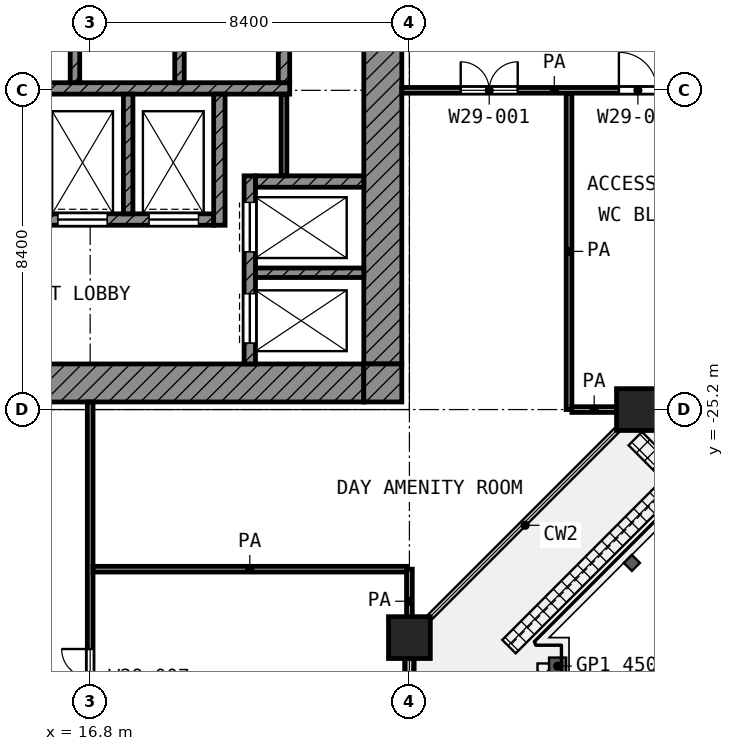
"""IFC4 building model, lengths in metres.
Left out: names, types, materials, properties, quantities, classifications, styles, units other than length and angle.
Written with IfcOpenShell. Run it as: python <this file> out.ifc"""

import sys

from ifc_helpers import new_model, si_unit, direction, frame, frame_2d, origin, origin_2d, place, context, subcontext, project, spatial, rectangle, extrude, element, fill, save


model = new_model("IFC4")
c1 = context("Model", 3, precision=1e-05, world=origin(), true_north=direction((0.0, 1.0)))
c2 = subcontext(c1, "Body", "Model", "MODEL_VIEW")
j1 = project(units=[si_unit("LENGTHUNIT", "METRE"), si_unit("PLANEANGLEUNIT", "RADIAN")], contexts=[c1])
p1 = place(None, origin())
s1 = spatial("IfcSite", under=j1, at=p1, CompositionType="ELEMENT")
p2 = place(p1, origin())
s2 = spatial("IfcBuilding", under=s1, at=p2, CompositionType="ELEMENT")
p3 = place(p2, frame((0.0, 0.0, 128.2)))
s3 = spatial("IfcBuildingStorey", under=s2, at=p3, CompositionType="ELEMENT", Elevation=128.2)
for number, where, z_axis, x_axis in (
    (1, (31.2, -25.2, 0.0), (0.0, 0.0, 1.0), (1.0, 0.0, 0.0)),
    (2, (25.2, -31.2, 0.0), (0.0, 0.0, 1.0), (1.0, 0.0, 0.0)),
):
    element("IfcColumn", number, at=place(p3, frame(where, z_axis=z_axis, x_axis=x_axis)), inside=s3, PredefinedType="COLUMN", context=c2, shape_type="SweptSolid", body=[
        extrude(rectangle(XDim=1.1, YDim=1.1, at=origin_2d()), origin(), (0.0, 0.0, 1.0), 4.2),
    ])
p4 = place(p3, frame((25.2, -34.992, 0.0), z_axis=(0.0, 0.0, 1.0), x_axis=(0.0, 1.0, 0.0)))
e3 = element("IfcWall", 3, at=p4, inside=s3, PredefinedType="SOLIDWALL", context=c2, shape_type="SweptSolid", body=[
    extrude(rectangle(XDim=3.242, YDim=0.25, at=frame_2d((1.621, 0.0))), origin(), (0.0, 0.0, 1.0), 3.48),
])
p5 = place(p4, frame((0.721, 0.0, 0.0)))
e4 = element("IfcOpeningElement", 4, at=p5, cuts=e3, PredefinedType="OPENING", context=c2, shape_type="SweptSolid", body=[
    extrude(rectangle(XDim=1.8, YDim=2.1, at=frame_2d((0.9, 1.05))), frame((0.0, 0.135, 0.0), z_axis=(0.0, -1.0, 0.0), x_axis=(1.0, 0.0, 0.0)), (0.0, 0.0, 1.0), 0.27),
])
p6 = place(p3, frame((24.5, -24.0, 0.0), z_axis=(0.0, 0.0, 1.0), x_axis=(0.0, 1.0, 0.0)))
e5 = element("IfcWall", 5, at=p6, inside=s3, PredefinedType="SHEAR", context=c2, shape_type="SweptSolid", body=[
    extrude(rectangle(XDim=18.6, YDim=1.0, at=frame_2d((9.3, 0.0))), origin(), (0.0, 0.0, 1.0), 3.6),
])
p7 = place(p6, frame((10.5, 0.0, 0.0)))
e6 = element("IfcOpeningElement", 6, at=p7, cuts=e5, PredefinedType="OPENING", context=c2, shape_type="SweptSolid", body=[
    extrude(rectangle(XDim=1.8, YDim=2.1, at=frame_2d((0.9, 1.05))), frame((0.0, 0.51, 0.0), z_axis=(0.0, -1.0, 0.0), x_axis=(1.0, 0.0, 0.0)), (0.0, 0.0, 1.0), 1.02),
])
p8 = place(p3, frame((5.4, -24.5, 0.0), z_axis=(0.0, 0.0, 1.0), x_axis=(1.0, 0.0, 0.0)))
e7 = element("IfcWall", 7, at=p8, inside=s3, PredefinedType="SHEAR", context=c2, shape_type="SweptSolid", body=[
    extrude(rectangle(XDim=18.6, YDim=1.0, at=frame_2d((9.3, 0.0))), origin(), (0.0, 0.0, 1.0), 3.6),
])
p9 = place(p8, frame((6.3, 0.0, 0.0)))
e8 = element("IfcOpeningElement", 8, at=p9, cuts=e7, PredefinedType="OPENING", context=c2, shape_type="SweptSolid", body=[
    extrude(rectangle(XDim=1.8, YDim=2.1, at=frame_2d((0.9, 1.05))), frame((0.0, 0.51, 0.0), z_axis=(0.0, -1.0, 0.0), x_axis=(1.0, 0.0, 0.0)), (0.0, 0.0, 1.0), 1.02),
])
p10 = place(p3, frame((24.5, -25.0, 0.0), z_axis=(0.0, 0.0, 1.0), x_axis=(0.0, 1.0, 0.0)))
e9 = element("IfcWall", 9, at=p10, inside=s3, PredefinedType="SHEAR", context=c2, shape_type="SweptSolid", body=[
    extrude(rectangle(XDim=1.0, YDim=1.0, at=frame_2d((0.5, 0.0))), origin(), (0.0, 0.0, 1.0), 3.6),
])
p11 = place(p3, frame((5.4, -16.75, 0.0), z_axis=(0.0, 0.0, 1.0), x_axis=(1.0, 0.0, 0.0)))
e10 = element("IfcWall", 10, at=p11, inside=s3, PredefinedType="SHEAR", context=c2, shape_type="SweptSolid", body=[
    extrude(rectangle(XDim=16.65, YDim=0.3, at=frame_2d((8.325, 0.0))), origin(), (0.0, 0.0, 1.0), 3.6),
])
p12 = place(p3, frame((5.4, -20.2, 0.0), z_axis=(0.0, 0.0, 1.0), x_axis=(1.0, 0.0, 0.0)))
e11 = element("IfcWall", 11, at=p12, inside=s3, PredefinedType="SHEAR", context=c2, shape_type="SweptSolid", body=[
    extrude(rectangle(XDim=14.65, YDim=0.3, at=frame_2d((7.325, 0.0))), origin(), (0.0, 0.0, 1.0), 3.6),
])
p13 = place(p12, frame((10.55, 0.0, 0.0)))
e12 = element("IfcOpeningElement", 12, at=p13, cuts=e11, PredefinedType="OPENING", context=c2, shape_type="SweptSolid", body=[
    extrude(rectangle(XDim=1.3, YDim=2.1, at=frame_2d((0.65, 1.05))), frame((0.0, 0.16, 0.0), z_axis=(0.0, -1.0, 0.0), x_axis=(1.0, 0.0, 0.0)), (0.0, 0.0, 1.0), 0.32),
])
p14 = place(p12, frame((12.95, 0.0, 0.0)))
e13 = element("IfcOpeningElement", 13, at=p14, cuts=e11, PredefinedType="OPENING", context=c2, shape_type="SweptSolid", body=[
    extrude(rectangle(XDim=1.3, YDim=2.1, at=frame_2d((0.65, 1.05))), frame((0.0, 0.16, 0.0), z_axis=(0.0, -1.0, 0.0), x_axis=(1.0, 0.0, 0.0)), (0.0, 0.0, 1.0), 0.32),
])
p15 = place(p12, frame((0.55, 0.0, 0.0)))
e14 = element("IfcOpeningElement", 14, at=p15, cuts=e11, PredefinedType="OPENING", context=c2, shape_type="SweptSolid", body=[
    extrude(rectangle(XDim=1.3, YDim=2.1, at=frame_2d((0.65, 1.05))), frame((0.0, 0.16, 0.0), z_axis=(0.0, -1.0, 0.0), x_axis=(1.0, 0.0, 0.0)), (0.0, 0.0, 1.0), 0.32),
])
p16 = place(p12, frame((2.95, 0.0, 0.0)))
e15 = element("IfcOpeningElement", 15, at=p16, cuts=e11, PredefinedType="OPENING", context=c2, shape_type="SweptSolid", body=[
    extrude(rectangle(XDim=1.3, YDim=2.1, at=frame_2d((0.65, 1.05))), frame((0.0, 0.16, 0.0), z_axis=(0.0, -1.0, 0.0), x_axis=(1.0, 0.0, 0.0)), (0.0, 0.0, 1.0), 0.32),
])
p17 = place(p12, frame((5.35, 0.0, 0.0)))
e16 = element("IfcOpeningElement", 16, at=p17, cuts=e11, PredefinedType="OPENING", context=c2, shape_type="SweptSolid", body=[
    extrude(rectangle(XDim=0.9, YDim=2.1, at=frame_2d((0.45, 1.05))), frame((0.0, 0.16, 0.0), z_axis=(0.0, -1.0, 0.0), x_axis=(1.0, 0.0, 0.0)), (0.0, 0.0, 1.0), 0.32),
])
p18 = place(p12, frame((7.75, 0.0, 0.0)))
e17 = element("IfcOpeningElement", 17, at=p18, cuts=e11, PredefinedType="OPENING", context=c2, shape_type="SweptSolid", body=[
    extrude(rectangle(XDim=0.9, YDim=2.1, at=frame_2d((0.45, 1.05))), frame((0.0, 0.16, 0.0), z_axis=(0.0, -1.0, 0.0), x_axis=(1.0, 0.0, 0.0)), (0.0, 0.0, 1.0), 0.32),
])
p19 = place(p3, frame((20.2, -20.35, 0.0), z_axis=(0.0, 0.0, 1.0), x_axis=(0.0, 1.0, 0.0)))
e18 = element("IfcWall", 18, at=p19, inside=s3, PredefinedType="SHEAR", context=c2, shape_type="SweptSolid", body=[
    extrude(rectangle(XDim=3.45, YDim=0.3, at=frame_2d((1.725, 0.0))), origin(), (0.0, 0.0, 1.0), 3.6),
])
p20 = place(p3, frame((21.9, -16.6, 0.0), z_axis=(0.0, 0.0, 1.0), x_axis=(0.0, 1.0, 0.0)))
e19 = element("IfcWall", 19, at=p20, inside=s3, PredefinedType="SHEAR", context=c2, shape_type="SweptSolid", body=[
    extrude(rectangle(XDim=2.35, YDim=0.3, at=frame_2d((1.175, 0.0))), origin(), (0.0, 0.0, 1.0), 3.6),
])
p21 = place(p3, frame((21.15, -19.2, 0.0), z_axis=(0.0, 0.0, 1.0), x_axis=(1.0, 0.0, 0.0)))
e20 = element("IfcWall", 20, at=p21, inside=s3, PredefinedType="SHEAR", context=c2, shape_type="SweptSolid", body=[
    extrude(rectangle(XDim=2.85, YDim=0.3, at=frame_2d((1.425, 0.0))), origin(), (0.0, 0.0, 1.0), 3.6),
])
p22 = place(p3, frame((21.0, -24.0, 0.0), z_axis=(0.0, 0.0, 1.0), x_axis=(0.0, 1.0, 0.0)))
e21 = element("IfcWall", 21, at=p22, inside=s3, PredefinedType="SHEAR", context=c2, shape_type="SweptSolid", body=[
    extrude(rectangle(XDim=4.95, YDim=0.3, at=frame_2d((2.475, 0.0))), origin(), (0.0, 0.0, 1.0), 3.6),
])
p23 = place(p22, frame((2.95, 0.0, 0.0)))
e22 = element("IfcOpeningElement", 22, at=p23, cuts=e21, PredefinedType="OPENING", context=c2, shape_type="SweptSolid", body=[
    extrude(rectangle(XDim=1.3, YDim=2.1, at=frame_2d((0.65, 1.05))), frame((0.0, 0.16, 0.0), z_axis=(0.0, -1.0, 0.0), x_axis=(1.0, 0.0, 0.0)), (0.0, 0.0, 1.0), 0.32),
])
p24 = place(p22, frame((0.55, 0.0, 0.0)))
e23 = element("IfcOpeningElement", 23, at=p24, cuts=e21, PredefinedType="OPENING", context=c2, shape_type="SweptSolid", body=[
    extrude(rectangle(XDim=1.3, YDim=2.1, at=frame_2d((0.65, 1.05))), frame((0.0, 0.16, 0.0), z_axis=(0.0, -1.0, 0.0), x_axis=(1.0, 0.0, 0.0)), (0.0, 0.0, 1.0), 0.32),
])
p25 = place(p3, frame((21.15, -21.6, 0.0), z_axis=(0.0, 0.0, 1.0), x_axis=(1.0, 0.0, 0.0)))
e24 = element("IfcWall", 24, at=p25, inside=s3, PredefinedType="SHEAR", context=c2, shape_type="SweptSolid", body=[
    extrude(rectangle(XDim=2.85, YDim=0.25, at=frame_2d((1.425, 0.0))), origin(), (0.0, 0.0, 1.0), 3.6),
])
p26 = place(p3, frame((17.8, -20.05, 0.0), z_axis=(0.0, 0.0, 1.0), x_axis=(0.0, 1.0, 0.0)))
e25 = element("IfcWall", 25, at=p26, inside=s3, PredefinedType="SHEAR", context=c2, shape_type="SweptSolid", body=[
    extrude(rectangle(XDim=3.15, YDim=0.25, at=frame_2d((1.575, 0.0))), origin(), (0.0, 0.0, 1.0), 3.6),
])
for number, where, z_axis, x_axis in (
    (26, (16.4, -16.6, 0.0), (0.0, 0.0, 1.0), (0.0, 1.0, 0.0)),
    (27, (19.15, -16.6, 0.0), (0.0, 0.0, 1.0), (0.0, 1.0, 0.0)),
):
    element("IfcWall", number, at=place(p3, frame(where, z_axis=z_axis, x_axis=x_axis)), inside=s3, PredefinedType="SHEAR", context=c2, shape_type="SweptSolid", body=[
        extrude(rectangle(XDim=2.35, YDim=0.25, at=frame_2d((1.175, 0.0))), origin(), (0.0, 0.0, 1.0), 3.6),
    ])
p27 = place(p3, frame((21.9, -19.05, 0.0), z_axis=(0.0, 0.0, 1.0), x_axis=(0.0, 1.0, 0.0)))
e28 = element("IfcWall", 28, at=p27, inside=s3, PredefinedType="PARTITIONING", context=c2, shape_type="SweptSolid", body=[
    extrude(rectangle(XDim=2.15, YDim=0.15, at=frame_2d((1.075, 0.0))), origin(), (0.0, 0.0, 1.0), 3.6),
])
p28 = place(p3, frame((16.875, -29.4, 0.0), z_axis=(0.0, 0.0, 1.0), x_axis=(1.0, 0.0, 0.0)))
e29 = element("IfcWall", 29, at=p28, inside=s3, PredefinedType="PARTITIONING", context=c2, shape_type="SweptSolid", body=[
    extrude(rectangle(XDim=8.25, YDim=0.15, at=frame_2d((4.125, 0.0))), origin(), (0.0, 0.0, 1.0), 3.6),
])
p29 = place(p3, frame((29.475, -25.2, 0.0), z_axis=(0.0, 0.0, 1.0), x_axis=(1.0, 0.0, 0.0)))
e30 = element("IfcWall", 30, at=p29, inside=s3, PredefinedType="PARTITIONING", context=c2, shape_type="SweptSolid", body=[
    extrude(rectangle(XDim=1.175, YDim=0.15, at=frame_2d((0.587, 0.0))), origin(), (0.0, 0.0, 1.0), 3.6),
])
p30 = place(p3, frame((25.0, -16.8, 0.0), z_axis=(0.0, 0.0, 1.0), x_axis=(1.0, 0.0, 0.0)))
e31 = element("IfcWall", 31, at=p30, inside=s3, PredefinedType="PARTITIONING", context=c2, shape_type="SweptSolid", body=[
    extrude(rectangle(XDim=8.025, YDim=0.15, at=frame_2d((4.012, 0.0))), origin(), (0.0, 0.0, 1.0), 3.6),
])
p31 = place(p30, frame((1.55, 0.0, 0.0)))
e32 = element("IfcOpeningElement", 32, at=p31, cuts=e31, PredefinedType="OPENING", context=c2, shape_type="SweptSolid", body=[
    extrude(rectangle(XDim=1.5, YDim=2.1, at=frame_2d((0.75, 1.05))), frame((0.0, 0.085, 0.0), z_axis=(0.0, -1.0, 0.0), x_axis=(1.0, 0.0, 0.0)), (0.0, 0.0, 1.0), 0.17),
])
p32 = place(p30, frame((5.712, 0.0, 0.0)))
e33 = element("IfcOpeningElement", 33, at=p32, cuts=e31, PredefinedType="OPENING", context=c2, shape_type="SweptSolid", body=[
    extrude(rectangle(XDim=1.0, YDim=2.1, at=frame_2d((0.5, 1.05))), frame((0.0, 0.085, 0.0), z_axis=(0.0, -1.0, 0.0), x_axis=(1.0, 0.0, 0.0)), (0.0, 0.0, 1.0), 0.17),
])
p33 = place(p3, frame((16.8, -58.72, 0.0), z_axis=(0.0, 0.0, 1.0), x_axis=(0.0, 1.0, 0.0)))
e34 = element("IfcWall", 34, at=p33, inside=s3, PredefinedType="PARTITIONING", context=c2, shape_type="SweptSolid", body=[
    extrude(rectangle(XDim=33.72, YDim=0.15, at=frame_2d((16.86, 0.0))), origin(), (0.0, 0.0, 1.0), 2.7),
])
p34 = place(p33, frame((25.72, 0.0, 0.0)))
e35 = element("IfcOpeningElement", 35, at=p34, cuts=e34, PredefinedType="OPENING", context=c2, shape_type="SweptSolid", body=[
    extrude(rectangle(XDim=1.5, YDim=2.1, at=frame_2d((0.75, 1.05))), frame((0.0, 0.085, 0.0), z_axis=(0.0, -1.0, 0.0), x_axis=(1.0, 0.0, 0.0)), (0.0, 0.0, 1.0), 0.17),
])
p35 = place(p33, frame((17.72, 0.0, 0.0)))
e36 = element("IfcOpeningElement", 36, at=p35, cuts=e34, PredefinedType="OPENING", context=c2, shape_type="SweptSolid", body=[
    extrude(rectangle(XDim=1.2, YDim=2.1, at=frame_2d((0.6, 1.05))), frame((0.0, 0.085, 0.0), z_axis=(0.0, -1.0, 0.0), x_axis=(1.0, 0.0, 0.0)), (0.0, 0.0, 1.0), 0.17),
])
p36 = place(p33, frame((14.92, 0.0, 0.0)))
e37 = element("IfcOpeningElement", 37, at=p36, cuts=e34, PredefinedType="OPENING", context=c2, shape_type="SweptSolid", body=[
    extrude(rectangle(XDim=1.2, YDim=2.1, at=frame_2d((0.6, 1.05))), frame((0.0, 0.085, 0.0), z_axis=(0.0, -1.0, 0.0), x_axis=(1.0, 0.0, 0.0)), (0.0, 0.0, 1.0), 0.17),
])
p37 = place(p33, frame((9.02, 0.0, 0.0)))
e38 = element("IfcOpeningElement", 38, at=p37, cuts=e34, PredefinedType="OPENING", context=c2, shape_type="SweptSolid", body=[
    extrude(rectangle(XDim=0.9, YDim=2.1, at=frame_2d((0.45, 1.05))), frame((0.0, 0.085, 0.0), z_axis=(0.0, -1.0, 0.0), x_axis=(1.0, 0.0, 0.0)), (0.0, 0.0, 1.0), 0.17),
])
p38 = place(p33, frame((3.37, 0.0, 0.0)))
e39 = element("IfcOpeningElement", 39, at=p38, cuts=e34, PredefinedType="OPENING", context=c2, shape_type="SweptSolid", body=[
    extrude(rectangle(XDim=1.5, YDim=2.1, at=frame_2d((0.75, 1.05))), frame((0.0, 0.085, 0.0), z_axis=(0.0, -1.0, 0.0), x_axis=(1.0, 0.0, 0.0)), (0.0, 0.0, 1.0), 0.17),
])
p39 = place(p3, frame((25.2, -31.087, 0.0), z_axis=(0.0, 0.0, 1.0), x_axis=(0.0, 1.0, 0.0)))
e40 = element("IfcWall", 40, at=p39, inside=s3, PredefinedType="PARTITIONING", context=c2, shape_type="SweptSolid", body=[
    extrude(rectangle(XDim=1.687, YDim=0.15, at=frame_2d((0.844, 0.0))), origin(), (0.0, 0.0, 1.0), 3.6),
])
p40 = place(p3, frame((29.4, -25.2, 0.0), z_axis=(0.0, 0.0, 1.0), x_axis=(0.0, 1.0, 0.0)))
e41 = element("IfcWall", 41, at=p40, inside=s3, PredefinedType="PARTITIONING", context=c2, shape_type="SweptSolid", body=[
    extrude(rectangle(XDim=8.325, YDim=0.15, at=frame_2d((4.163, 0.0))), origin(), (0.0, 0.0, 1.0), 3.6),
])
p41 = place(p23, origin())
e42 = element("IfcDoor", 42, at=p41, inside=s3, OperationType="DOUBLE_DOOR_SLIDING", PredefinedType="DOOR", context=c2, shape_type="SweptSolid", body=[
    extrude(rectangle(XDim=1.3, YDim=2.1, at=frame_2d((0.65, 1.05))), frame((0.0, 0.025, 0.0), z_axis=(0.0, -1.0, 0.0), x_axis=(1.0, 0.0, 0.0)), (0.0, 0.0, 1.0), 0.05),
])
fill(e22, e42)
p42 = place(p24, origin())
e43 = element("IfcDoor", 43, at=p42, inside=s3, OperationType="DOUBLE_DOOR_SLIDING", PredefinedType="DOOR", context=c2, shape_type="SweptSolid", body=[
    extrude(rectangle(XDim=1.3, YDim=2.1, at=frame_2d((0.65, 1.05))), frame((0.0, 0.025, 0.0), z_axis=(0.0, -1.0, 0.0), x_axis=(1.0, 0.0, 0.0)), (0.0, 0.0, 1.0), 0.05),
])
fill(e23, e43)
p43 = place(p13, origin())
e44 = element("IfcDoor", 44, at=p43, inside=s3, OperationType="DOUBLE_DOOR_SLIDING", PredefinedType="DOOR", context=c2, shape_type="SweptSolid", body=[
    extrude(rectangle(XDim=1.3, YDim=2.1, at=frame_2d((0.65, 1.05))), frame((0.0, 0.025, 0.0), z_axis=(0.0, -1.0, 0.0), x_axis=(1.0, 0.0, 0.0)), (0.0, 0.0, 1.0), 0.05),
])
fill(e12, e44)
p44 = place(p14, origin())
e45 = element("IfcDoor", 45, at=p44, inside=s3, OperationType="DOUBLE_DOOR_SLIDING", PredefinedType="DOOR", context=c2, shape_type="SweptSolid", body=[
    extrude(rectangle(XDim=1.3, YDim=2.1, at=frame_2d((0.65, 1.05))), frame((0.0, 0.025, 0.0), z_axis=(0.0, -1.0, 0.0), x_axis=(1.0, 0.0, 0.0)), (0.0, 0.0, 1.0), 0.05),
])
fill(e13, e45)
p45 = place(p31, origin())
e46 = element("IfcDoor", 46, at=p45, inside=s3, OperationType="DOUBLE_DOOR_SINGLE_SWING", PredefinedType="DOOR", context=c2, shape_type="SweptSolid", body=[
    extrude(rectangle(XDim=1.5, YDim=2.1, at=frame_2d((0.75, 1.05))), frame((0.0, 0.025, 0.0), z_axis=(0.0, -1.0, 0.0), x_axis=(1.0, 0.0, 0.0)), (0.0, 0.0, 1.0), 0.05),
])
fill(e32, e46)
p46 = place(p32, origin())
e47 = element("IfcDoor", 47, at=p46, inside=s3, OperationType="SINGLE_SWING_LEFT", PredefinedType="DOOR", context=c2, shape_type="SweptSolid", body=[
    extrude(rectangle(XDim=1.0, YDim=2.1, at=frame_2d((0.5, 1.05))), frame((0.0, 0.025, 0.0), z_axis=(0.0, -1.0, 0.0), x_axis=(1.0, 0.0, 0.0)), (0.0, 0.0, 1.0), 0.05),
])
fill(e33, e47)
p47 = place(p34, origin())
e48 = element("IfcDoor", 48, at=p47, inside=s3, OperationType="DOUBLE_DOOR_SINGLE_SWING", PredefinedType="DOOR", context=c2, shape_type="SweptSolid", body=[
    extrude(rectangle(XDim=1.5, YDim=2.1, at=frame_2d((0.75, 1.05))), frame((0.0, 0.025, 0.0), z_axis=(0.0, -1.0, 0.0), x_axis=(1.0, 0.0, 0.0)), (0.0, 0.0, 1.0), 0.05),
])
fill(e35, e48)
save(model, sys.argv[1])
